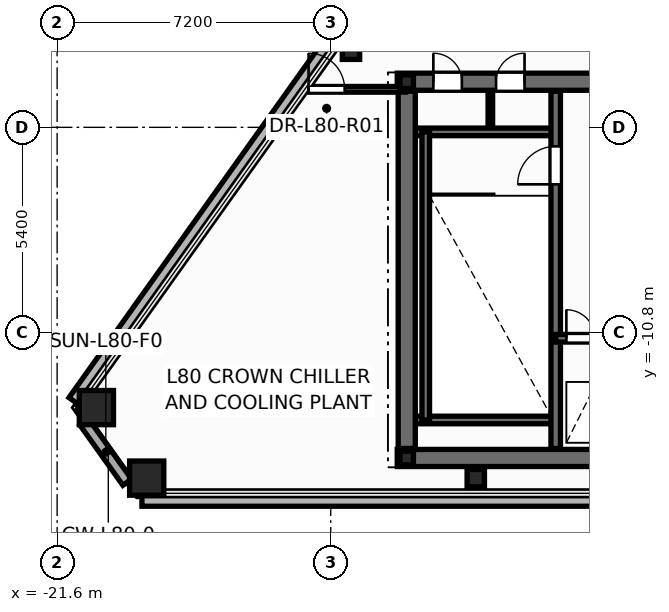
"""IFC4 building model, lengths in metres.
Left out: names, types, materials, properties, quantities, classifications, styles, units other than length and angle.
Written with IfcOpenShell. Run it as: python <this file> out.ifc"""

import sys

from ifc_helpers import new_model, si_unit, direction, frame, frame_2d, origin, origin_2d, place, context, subcontext, project, spatial, rectangle, hollow_rectangle, hollow_circle, i_section, extrude, element, fill, save


model = new_model("IFC4")
c1 = context("Model", 3, precision=1e-05, world=origin(), true_north=direction((0.0, 1.0)))
c2 = subcontext(c1, "Body", "Model", "MODEL_VIEW")
j1 = project(units=[si_unit("LENGTHUNIT", "METRE"), si_unit("PLANEANGLEUNIT", "RADIAN")], contexts=[c1])
p1 = place(None, origin())
s1 = spatial("IfcSite", under=j1, at=p1, CompositionType="ELEMENT")
p2 = place(p1, origin())
s2 = spatial("IfcBuilding", under=s1, at=p2, CompositionType="ELEMENT")
p3 = place(p2, frame((0.0, 0.0, 306.0)))
s3 = spatial("IfcBuildingStorey", under=s2, at=p3, CompositionType="ELEMENT", Elevation=306.0)
p4 = place(p3, frame((-20.567, -12.775, 0.0), z_axis=(0.0, 0.0, 1.0), x_axis=(1.0, 0.0, 0.0)))
e1 = element("IfcColumn", 1, at=p4, inside=s3, PredefinedType="COLUMN", context=c2, shape_type="SweptSolid", body=[
    extrude(hollow_rectangle(XDim=0.9, YDim=0.9, WallThickness=0.04, at=origin_2d()), origin(), (0.0, 0.0, 1.0), 4.2),
])
p5 = place(p3, frame((-19.243, -14.63, 0.0), z_axis=(0.0, 0.0, 1.0), x_axis=(1.0, 0.0, 0.0)))
e2 = element("IfcColumn", 2, at=p5, inside=s3, PredefinedType="COLUMN", context=c2, shape_type="SweptSolid", body=[
    extrude(hollow_rectangle(XDim=0.9, YDim=0.9, WallThickness=0.04, at=origin_2d()), origin(), (0.0, 0.0, 1.0), 3.396),
])
p6 = place(p3, frame((-10.583, -14.63, 0.0), z_axis=(0.0, 0.0, 1.0), x_axis=(1.0, 0.0, 0.0)))
e3 = element("IfcColumn", 3, at=p6, inside=s3, PredefinedType="COLUMN", context=c2, shape_type="SweptSolid", body=[
    extrude(hollow_circle(Radius=0.229, WallThickness=0.016, at=origin_2d()), origin(), (0.0, 0.0, 1.0), 3.396),
])
p7 = place(p3, frame((-13.868, -3.385, 0.0), z_axis=(0.0, 0.0, 1.0), x_axis=(1.0, 0.0, 0.0)))
e4 = element("IfcColumn", 4, at=p7, inside=s3, PredefinedType="COLUMN", context=c2, shape_type="SweptSolid", body=[
    extrude(hollow_circle(Radius=0.229, WallThickness=0.016, at=origin_2d()), origin(), (0.0, 0.0, 1.0), 4.2),
])
p8 = place(p3, frame((-12.4, -14.1, 0.0), z_axis=(0.0, 0.0, 1.0), x_axis=(1.0, 0.0, 0.0)))
e5 = element("IfcColumn", 5, at=p8, inside=s3, PredefinedType="COLUMN", context=c2, shape_type="SweptSolid", body=[
    extrude(i_section(OverallWidth=0.352, OverallDepth=0.359, WebThickness=0.018, FlangeThickness=0.026, at=origin_2d()), origin(), (0.0, 0.0, 1.0), 3.638),
])
p9 = place(p3, frame((-12.4, -4.2, 0.0), z_axis=(0.0, 0.0, 1.0), x_axis=(1.0, 0.0, 0.0)))
e6 = element("IfcColumn", 6, at=p9, inside=s3, PredefinedType="COLUMN", context=c2, shape_type="SweptSolid", body=[
    extrude(i_section(OverallWidth=0.352, OverallDepth=0.359, WebThickness=0.018, FlangeThickness=0.026, at=origin_2d()), origin(), (0.0, 0.0, 1.0), 4.2),
])
p10 = place(p3, frame((-19.369, -15.19, -0.2), z_axis=(0.0, 0.0, 1.0), x_axis=(1.0, 0.0, 0.0)))
e7 = element("IfcWall", 7, at=p10, inside=s3, PredefinedType="PARAPET", context=c2, shape_type="SweptSolid", body=[
    extrude(rectangle(XDim=38.738, YDim=0.36, at=frame_2d((19.369, 0.0))), origin(), (0.0, 0.0, 1.0), 0.38),
])
p11 = place(p3, frame((-1.81, 14.482, -0.2), z_axis=(0.0, 0.0, 1.0), x_axis=(-0.580755919834, -0.814077736815, 0.0)))
e8 = element("IfcWall", 8, at=p11, inside=s3, PredefinedType="PARAPET", context=c2, shape_type="SweptSolid", body=[
    extrude(rectangle(XDim=33.288, YDim=0.36, at=frame_2d((16.644, 0.0))), origin(), (0.0, 0.0, 1.0), 0.38),
])
p12 = place(p3, frame((-10.2, -5.52, 0.0), z_axis=(0.0, 0.0, 1.0), x_axis=(0.0, 1.0, 0.0)))
e9 = element("IfcWall", 9, at=p12, inside=s3, PredefinedType="PARTITIONING", context=c2, shape_type="SweptSolid", body=[
    extrude(rectangle(XDim=1.12, YDim=0.12, at=frame_2d((0.56, 0.0))), origin(), (0.0, 0.0, 1.0), 3.9),
])
p13 = place(p3, frame((-12.65, -14.1, 0.0), z_axis=(0.0, 0.0, 1.0), x_axis=(1.0, 0.0, 0.0)))
e10 = element("IfcWall", 10, at=p13, inside=s3, PredefinedType="SHEAR", context=c2, shape_type="SweptSolid", body=[
    extrude(rectangle(XDim=25.3, YDim=0.45, at=frame_2d((12.65, 0.0))), origin(), (0.0, 0.0, 1.0), 3.9),
])
p14 = place(p3, frame((-12.65, -4.2, 0.0), z_axis=(0.0, 0.0, 1.0), x_axis=(1.0, 0.0, 0.0)))
e11 = element("IfcWall", 11, at=p14, inside=s3, PredefinedType="SHEAR", context=c2, shape_type="SweptSolid", body=[
    extrude(rectangle(XDim=25.3, YDim=0.45, at=frame_2d((12.65, 0.0))), origin(), (0.0, 0.0, 1.0), 3.9),
])
p15 = place(p14, frame((0.95, 0.0, 0.0)))
e12 = element("IfcOpeningElement", 12, at=p15, cuts=e11, PredefinedType="OPENING", context=c2, shape_type="SweptSolid", body=[
    extrude(rectangle(XDim=0.756, YDim=2.054, at=frame_2d((0.375, 1.027))), frame((0.0, 0.235, 0.0), z_axis=(0.0, -1.0, 0.0), x_axis=(1.0, 0.0, 0.0)), (0.0, 0.0, 1.0), 0.47),
])
p16 = place(p14, frame((2.6, 0.0, 0.0)))
e13 = element("IfcOpeningElement", 13, at=p16, cuts=e11, PredefinedType="OPENING", context=c2, shape_type="SweptSolid", body=[
    extrude(rectangle(XDim=0.756, YDim=2.054, at=frame_2d((0.375, 1.027))), frame((0.0, 0.235, 0.0), z_axis=(0.0, -1.0, 0.0), x_axis=(1.0, 0.0, 0.0)), (0.0, 0.0, 1.0), 0.47),
])
p17 = place(p14, frame((21.85, 0.0, 0.0)))
e14 = element("IfcOpeningElement", 14, at=p17, cuts=e11, PredefinedType="OPENING", context=c2, shape_type="SweptSolid", body=[
    extrude(rectangle(XDim=0.756, YDim=2.054, at=frame_2d((0.375, 1.027))), frame((0.0, 0.235, 0.0), z_axis=(0.0, -1.0, 0.0), x_axis=(1.0, 0.0, 0.0)), (0.0, 0.0, 1.0), 0.47),
])
p18 = place(p14, frame((23.5, 0.0, 0.0)))
e15 = element("IfcOpeningElement", 15, at=p18, cuts=e11, PredefinedType="OPENING", context=c2, shape_type="SweptSolid", body=[
    extrude(rectangle(XDim=0.756, YDim=2.054, at=frame_2d((0.375, 1.027))), frame((0.0, 0.235, 0.0), z_axis=(0.0, -1.0, 0.0), x_axis=(1.0, 0.0, 0.0)), (0.0, 0.0, 1.0), 0.47),
])
p19 = place(p14, frame((5.85, 0.0, 0.0)))
e16 = element("IfcOpeningElement", 16, at=p19, cuts=e11, PredefinedType="OPENING", context=c2, shape_type="SweptSolid", body=[
    extrude(rectangle(XDim=1.006, YDim=2.104, at=frame_2d((0.5, 1.052))), frame((0.0, 0.235, 0.0), z_axis=(0.0, -1.0, 0.0), x_axis=(1.0, 0.0, 0.0)), (0.0, 0.0, 1.0), 0.47),
])
p20 = place(p14, frame((10.35, 0.0, 0.0)))
e17 = element("IfcOpeningElement", 17, at=p20, cuts=e11, PredefinedType="OPENING", context=c2, shape_type="SweptSolid", body=[
    extrude(rectangle(XDim=1.406, YDim=2.154, at=frame_2d((0.7, 1.077))), frame((0.0, 0.235, 0.0), z_axis=(0.0, -1.0, 0.0), x_axis=(1.0, 0.0, 0.0)), (0.0, 0.0, 1.0), 0.47),
])
p21 = place(p14, frame((18.45, 0.0, 0.0)))
e18 = element("IfcOpeningElement", 18, at=p21, cuts=e11, PredefinedType="OPENING", context=c2, shape_type="SweptSolid", body=[
    extrude(rectangle(XDim=1.006, YDim=2.104, at=frame_2d((0.5, 1.052))), frame((0.0, 0.235, 0.0), z_axis=(0.0, -1.0, 0.0), x_axis=(1.0, 0.0, 0.0)), (0.0, 0.0, 1.0), 0.47),
])
for number, where, z_axis, x_axis in (
    (19, (-12.35, -5.52, 0.0), (0.0, 0.0, 1.0), (1.0, 0.0, 0.0)),
    (20, (-12.35, -13.1, 0.0), (0.0, 0.0, 1.0), (1.0, 0.0, 0.0)),
):
    element("IfcWall", number, at=place(p3, frame(where, z_axis=z_axis, x_axis=x_axis)), inside=s3, PredefinedType="SOLIDWALL", context=c2, shape_type="SweptSolid", body=[
        extrude(rectangle(XDim=3.87, YDim=0.2, at=frame_2d((1.935, 0.0))), origin(), (0.0, 0.0, 1.0), 3.9),
    ])
p22 = place(p3, frame((-11.9, -13.1, 0.0), z_axis=(0.0, 0.0, 1.0), x_axis=(0.0, 1.0, 0.0)))
e21 = element("IfcWall", 21, at=p22, inside=s3, PredefinedType="SOLIDWALL", context=c2, shape_type="SweptSolid", body=[
    extrude(rectangle(XDim=7.58, YDim=0.2, at=frame_2d((3.79, 0.0))), origin(), (0.0, 0.0, 1.0), 3.9),
])
p23 = place(p3, frame((-8.48, -13.85, 0.0), z_axis=(0.0, 0.0, 1.0), x_axis=(0.0, 1.0, 0.0)))
e22 = element("IfcWall", 22, at=p23, inside=s3, PredefinedType="SHEAR", context=c2, shape_type="SweptSolid", body=[
    extrude(rectangle(XDim=9.4, YDim=0.25, at=frame_2d((4.7, 0.0))), origin(), (0.0, 0.0, 1.0), 3.9),
])
p24 = place(p23, frame((6.95, 0.0, 0.0)))
e23 = element("IfcOpeningElement", 23, at=p24, cuts=e22, PredefinedType="OPENING", context=c2, shape_type="SweptSolid", body=[
    extrude(rectangle(XDim=1.006, YDim=2.104, at=frame_2d((0.5, 1.052))), frame((0.0, 0.135, 0.0), z_axis=(0.0, -1.0, 0.0), x_axis=(1.0, 0.0, 0.0)), (0.0, 0.0, 1.0), 0.27),
])
p25 = place(p3, frame((-8.48, -10.95, 0.0), z_axis=(0.0, 0.0, 1.0), x_axis=(1.0, 0.0, 0.0)))
e24 = element("IfcWall", 24, at=p25, inside=s3, PredefinedType="SOLIDWALL", context=c2, shape_type="SweptSolid", body=[
    extrude(rectangle(XDim=3.36, YDim=0.2, at=frame_2d((1.68, 0.0))), origin(), (0.0, 0.0, 1.0), 3.9),
])
p26 = place(p25, frame((0.28, 0.0, 0.0)))
e25 = element("IfcOpeningElement", 25, at=p26, cuts=e24, PredefinedType="OPENING", context=c2, shape_type="SweptSolid", body=[
    extrude(rectangle(XDim=0.756, YDim=2.054, at=frame_2d((0.375, 1.027))), frame((0.0, 0.11, 0.0), z_axis=(0.0, -1.0, 0.0), x_axis=(1.0, 0.0, 0.0)), (0.0, 0.0, 1.0), 0.22),
])
p27 = place(p25, frame((1.85, 0.0, 0.0)))
e26 = element("IfcOpeningElement", 26, at=p27, cuts=e24, PredefinedType="OPENING", context=c2, shape_type="SweptSolid", body=[
    extrude(rectangle(XDim=1.106, YDim=2.104, at=frame_2d((0.55, 1.052))), frame((0.0, 0.11, 0.0), z_axis=(0.0, -1.0, 0.0), x_axis=(1.0, 0.0, 0.0)), (0.0, 0.0, 1.0), 0.22),
])
p28 = place(p3, frame((-12.4, -13.85, 0.0), z_axis=(0.0, 0.0, 1.0), x_axis=(0.0, 1.0, 0.0)))
e27 = element("IfcWall", 27, at=p28, inside=s3, PredefinedType="SHEAR", context=c2, shape_type="SweptSolid", body=[
    extrude(rectangle(XDim=9.4, YDim=0.45, at=frame_2d((4.7, 0.0))), origin(), (0.0, 0.0, 1.0), 3.9),
])
p29 = place(p3, frame((-15.083, -4.4, 0.0), z_axis=(0.0, 0.0, 1.0), x_axis=(1.0, 0.0, 0.0)))
e28 = element("IfcWall", 28, at=p29, inside=s3, PredefinedType="PARTITIONING", context=c2, shape_type="SweptSolid", body=[
    extrude(rectangle(XDim=2.644, YDim=0.15, at=frame_2d((1.322, 0.0))), origin(), (0.0, 0.0, 1.0), 2.625),
])
p30 = place(p29, frame((0.1, 0.0, 0.0)))
e29 = element("IfcOpeningElement", 29, at=p30, cuts=e28, PredefinedType="OPENING", context=c2, shape_type="SweptSolid", body=[
    extrude(rectangle(XDim=0.956, YDim=2.104, at=frame_2d((0.475, 1.052))), frame((0.0, 0.085, 0.0), z_axis=(0.0, -1.0, 0.0), x_axis=(1.0, 0.0, 0.0)), (0.0, 0.0, 1.0), 0.17),
])
p31 = place(p24, origin())
e30 = element("IfcDoor", 30, at=p31, inside=s3, OperationType="SINGLE_SWING_LEFT", PredefinedType="DOOR", context=c2, shape_type="SweptSolid", body=[
    extrude(rectangle(XDim=1.0, YDim=2.1, at=frame_2d((0.5, 1.05))), frame((0.0, 0.025, 0.0), z_axis=(0.0, -1.0, 0.0), x_axis=(1.0, 0.0, 0.0)), (0.0, 0.0, 1.0), 0.05),
])
fill(e23, e30)
p32 = place(p26, origin())
e31 = element("IfcDoor", 31, at=p32, inside=s3, OperationType="SINGLE_SWING_LEFT", PredefinedType="DOOR", context=c2, shape_type="SweptSolid", body=[
    extrude(rectangle(XDim=0.75, YDim=2.05, at=frame_2d((0.375, 1.025))), frame((0.0, 0.025, 0.0), z_axis=(0.0, -1.0, 0.0), x_axis=(1.0, 0.0, 0.0)), (0.0, 0.0, 1.0), 0.05),
])
fill(e25, e31)
p33 = place(p15, origin())
e32 = element("IfcDoor", 32, at=p33, inside=s3, OperationType="SINGLE_SWING_LEFT", PredefinedType="DOOR", context=c2, shape_type="SweptSolid", body=[
    extrude(rectangle(XDim=0.75, YDim=2.05, at=frame_2d((0.375, 1.025))), frame((0.0, 0.025, 0.0), z_axis=(0.0, -1.0, 0.0), x_axis=(1.0, 0.0, 0.0)), (0.0, 0.0, 1.0), 0.05),
])
fill(e12, e32)
p34 = place(p16, origin())
e33 = element("IfcDoor", 33, at=p34, inside=s3, OperationType="SINGLE_SWING_RIGHT", PredefinedType="DOOR", context=c2, shape_type="SweptSolid", body=[
    extrude(rectangle(XDim=0.75, YDim=2.05, at=frame_2d((0.375, 1.025))), frame((0.0, 0.025, 0.0), z_axis=(0.0, -1.0, 0.0), x_axis=(1.0, 0.0, 0.0)), (0.0, 0.0, 1.0), 0.05),
])
fill(e13, e33)
p35 = place(p30, origin())
e34 = element("IfcDoor", 34, at=p35, inside=s3, OperationType="SINGLE_SWING_LEFT", PredefinedType="DOOR", context=c2, shape_type="SweptSolid", body=[
    extrude(rectangle(XDim=0.95, YDim=2.1, at=frame_2d((0.475, 1.05))), frame((0.0, 0.025, 0.0), z_axis=(0.0, -1.0, 0.0), x_axis=(1.0, 0.0, 0.0)), (0.0, 0.0, 1.0), 0.05),
])
fill(e29, e34)
save(model, sys.argv[1])
